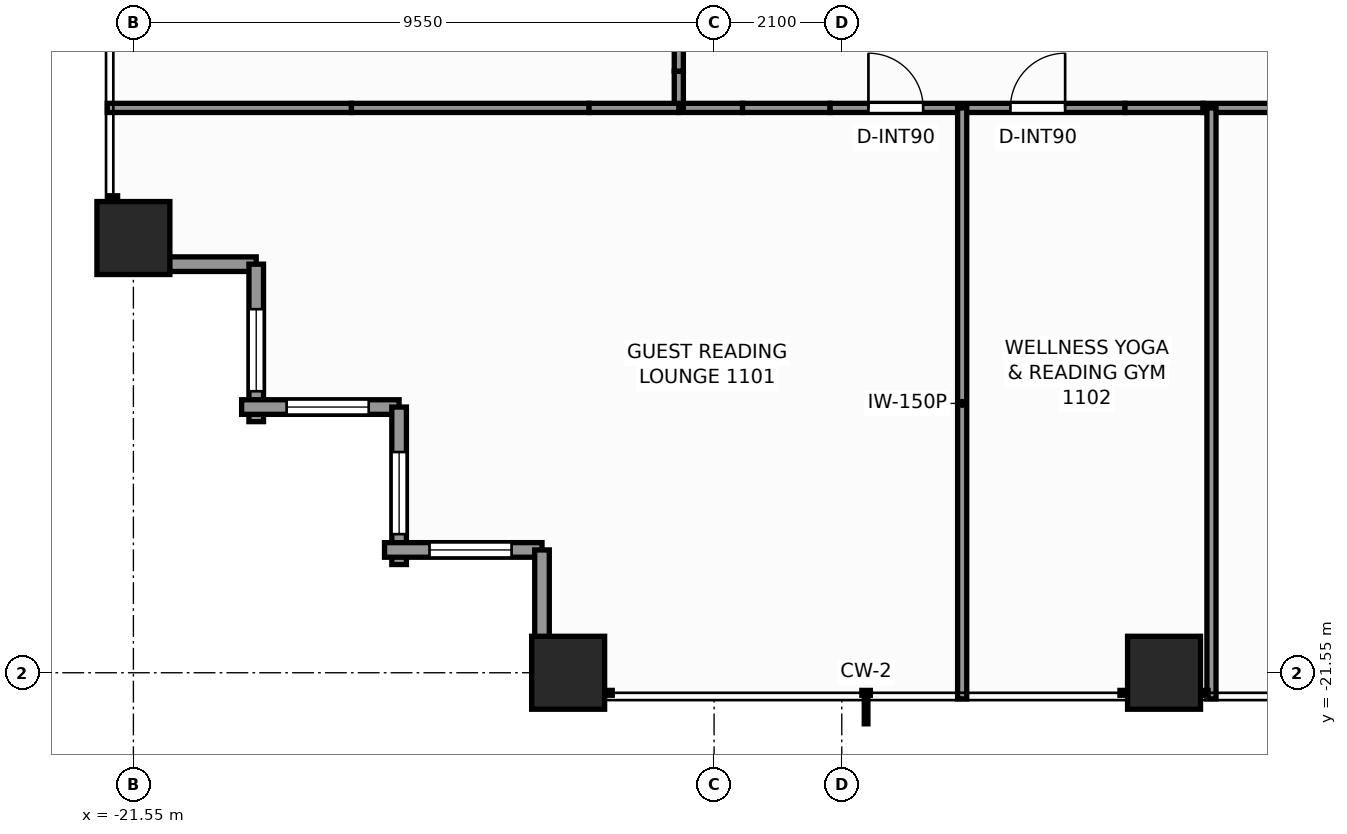
"""IFC4 building model, lengths in metres.
Left out: names, types, materials, properties, quantities, classifications, styles, units other than length and angle.
Written with IfcOpenShell. Run it as: python <this file> out.ifc"""

import sys

from ifc_helpers import new_model, si_unit, direction, frame, frame_2d, origin, origin_2d, place, context, subcontext, project, spatial, rectangle, extrude, element, fill, save


model = new_model("IFC4")
c1 = context("Model", 3, precision=1e-05, world=origin(), true_north=direction((0.0, 1.0)))
c2 = subcontext(c1, "Body", "Model", "MODEL_VIEW")
j1 = project(units=[si_unit("LENGTHUNIT", "METRE"), si_unit("PLANEANGLEUNIT", "RADIAN")], contexts=[c1])
p1 = place(None, origin())
s1 = spatial("IfcSite", under=j1, at=p1, CompositionType="ELEMENT")
p2 = place(p1, origin())
s2 = spatial("IfcBuilding", under=s1, at=p2, CompositionType="ELEMENT")
p3 = place(p2, frame((0.0, 0.0, 40.3)))
s3 = spatial("IfcBuildingStorey", under=s2, at=p3, CompositionType="ELEMENT", Elevation=40.3)
for number, where, z_axis, x_axis in (
    (1, (-14.4, -21.55, 0.0), (0.0, 0.0, 1.0), (1.0, 0.0, 0.0)),
    (2, (-4.6, -21.55, 0.0), (0.0, 0.0, 1.0), (1.0, 0.0, 0.0)),
    (3, (-21.55, -14.4, 0.0), (0.0, 0.0, 1.0), (1.0, 0.0, 0.0)),
):
    element("IfcColumn", number, at=place(p3, frame(where, z_axis=z_axis, x_axis=x_axis)), inside=s3, PredefinedType="COLUMN", context=c2, shape_type="SweptSolid", body=[
        extrude(rectangle(XDim=1.2, YDim=1.2, at=origin_2d()), origin(), (0.0, 0.0, 1.0), 3.3),
    ])
p4 = place(p3, frame((-19.53, -14.83, 0.0), z_axis=(0.0, 0.0, 1.0), x_axis=(-1.0, 0.0, 0.0)))
e4 = element("IfcWall", 4, at=p4, inside=s3, PredefinedType="STANDARD", context=c2, shape_type="SweptSolid", body=[
    extrude(rectangle(XDim=2.59, YDim=0.24, at=frame_2d((1.295, 0.0))), origin(), (0.0, 0.0, 1.0), 1.255),
])
p5 = place(p3, frame((-19.53, -17.42, 0.0), z_axis=(0.0, 0.0, 1.0), x_axis=(0.0, 1.0, 0.0)))
e5 = element("IfcWall", 5, at=p5, inside=s3, PredefinedType="STANDARD", context=c2, shape_type="SweptSolid", body=[
    extrude(rectangle(XDim=2.59, YDim=0.24, at=frame_2d((1.295, 0.0))), origin(), (0.0, 0.0, 1.0), 2.439),
])
p6 = place(p5, frame((0.5, 0.0, 0.65)))
e6 = element("IfcOpeningElement", 6, at=p6, cuts=e5, PredefinedType="OPENING", context=c2, shape_type="SweptSolid", body=[
    extrude(rectangle(XDim=1.35, YDim=1.55, at=frame_2d((0.675, 0.775))), frame((0.0, 0.13, 0.0), z_axis=(0.0, -1.0, 0.0), x_axis=(1.0, 0.0, 0.0)), (0.0, 0.0, 1.0), 0.26),
])
p7 = place(p3, frame((-17.18, -17.18, 0.0), z_axis=(0.0, 0.0, 1.0), x_axis=(-1.0, 0.0, 0.0)))
e7 = element("IfcWall", 7, at=p7, inside=s3, PredefinedType="STANDARD", context=c2, shape_type="SweptSolid", body=[
    extrude(rectangle(XDim=2.59, YDim=0.24, at=frame_2d((1.295, 0.0))), origin(), (0.0, 0.0, 1.0), 2.439),
])
p8 = place(p7, frame((0.5, 0.0, 0.65)))
e8 = element("IfcOpeningElement", 8, at=p8, cuts=e7, PredefinedType="OPENING", context=c2, shape_type="SweptSolid", body=[
    extrude(rectangle(XDim=1.35, YDim=1.55, at=frame_2d((0.675, 0.775))), frame((0.0, 0.13, 0.0), z_axis=(0.0, -1.0, 0.0), x_axis=(1.0, 0.0, 0.0)), (0.0, 0.0, 1.0), 0.26),
])
p9 = place(p3, frame((-17.18, -19.77, 0.0), z_axis=(0.0, 0.0, 1.0), x_axis=(0.0, 1.0, 0.0)))
e9 = element("IfcWall", 9, at=p9, inside=s3, PredefinedType="STANDARD", context=c2, shape_type="SweptSolid", body=[
    extrude(rectangle(XDim=2.59, YDim=0.24, at=frame_2d((1.295, 0.0))), origin(), (0.0, 0.0, 1.0), 2.439),
])
p10 = place(p9, frame((0.5, 0.0, 0.65)))
e10 = element("IfcOpeningElement", 10, at=p10, cuts=e9, PredefinedType="OPENING", context=c2, shape_type="SweptSolid", body=[
    extrude(rectangle(XDim=1.35, YDim=1.55, at=frame_2d((0.675, 0.775))), frame((0.0, 0.13, 0.0), z_axis=(0.0, -1.0, 0.0), x_axis=(1.0, 0.0, 0.0)), (0.0, 0.0, 1.0), 0.26),
])
p11 = place(p3, frame((-14.83, -19.53, 0.0), z_axis=(0.0, 0.0, 1.0), x_axis=(-1.0, 0.0, 0.0)))
e11 = element("IfcWall", 11, at=p11, inside=s3, PredefinedType="STANDARD", context=c2, shape_type="SweptSolid", body=[
    extrude(rectangle(XDim=2.59, YDim=0.24, at=frame_2d((1.295, 0.0))), origin(), (0.0, 0.0, 1.0), 2.439),
])
p12 = place(p11, frame((0.5, 0.0, 0.65)))
e12 = element("IfcOpeningElement", 12, at=p12, cuts=e11, PredefinedType="OPENING", context=c2, shape_type="SweptSolid", body=[
    extrude(rectangle(XDim=1.35, YDim=1.55, at=frame_2d((0.675, 0.775))), frame((0.0, 0.13, 0.0), z_axis=(0.0, -1.0, 0.0), x_axis=(1.0, 0.0, 0.0)), (0.0, 0.0, 1.0), 0.26),
])
p13 = place(p3, frame((-14.83, -22.12, 0.0), z_axis=(0.0, 0.0, 1.0), x_axis=(0.0, 1.0, 0.0)))
e13 = element("IfcWall", 13, at=p13, inside=s3, PredefinedType="STANDARD", context=c2, shape_type="SweptSolid", body=[
    extrude(rectangle(XDim=2.59, YDim=0.24, at=frame_2d((1.295, 0.0))), origin(), (0.0, 0.0, 1.0), 1.255),
])
p14 = place(p3, frame((-12.58, -12.26, 0.0), z_axis=(0.0, 0.0, 1.0), x_axis=(1.0, 0.0, 0.0)))
e14 = element("IfcWall", 14, at=p14, inside=s3, PredefinedType="PARTITIONING", context=c2, shape_type="SweptSolid", body=[
    extrude(rectangle(XDim=1.049, YDim=0.15, at=frame_2d((0.524, 0.0))), origin(), (0.0, 0.0, 1.0), 3.06),
])
p15 = place(p3, frame((-11.531, -12.26, 0.0), z_axis=(0.0, 0.0, 1.0), x_axis=(1.0, 0.0, 0.0)))
e15 = element("IfcWall", 15, at=p15, inside=s3, PredefinedType="PARTITIONING", context=c2, shape_type="SweptSolid", body=[
    extrude(rectangle(XDim=1.439, YDim=0.15, at=frame_2d((0.72, 0.0))), origin(), (0.0, 0.0, 1.0), 1.245),
])
p16 = place(p3, frame((-10.092, -12.26, 0.0), z_axis=(0.0, 0.0, 1.0), x_axis=(1.0, 0.0, 0.0)))
e16 = element("IfcWall", 16, at=p16, inside=s3, PredefinedType="PARTITIONING", context=c2, shape_type="SweptSolid", body=[
    extrude(rectangle(XDim=4.85, YDim=0.15, at=frame_2d((2.425, 0.0))), origin(), (0.0, 0.0, 1.0), 3.06),
])
p17 = place(p16, frame((0.63, 0.0, 0.0)))
e17 = element("IfcOpeningElement", 17, at=p17, cuts=e16, PredefinedType="OPENING", context=c2, shape_type="SweptSolid", body=[
    extrude(rectangle(XDim=0.9, YDim=2.06, at=frame_2d((0.45, 1.03))), frame((0.0, 0.085, 0.0), z_axis=(0.0, -1.0, 0.0), x_axis=(1.0, 0.0, 0.0)), (0.0, 0.0, 1.0), 0.17),
])
p18 = place(p16, frame((2.965, 0.0, 0.0)))
e18 = element("IfcOpeningElement", 18, at=p18, cuts=e16, PredefinedType="OPENING", context=c2, shape_type="SweptSolid", body=[
    extrude(rectangle(XDim=0.9, YDim=2.06, at=frame_2d((0.45, 1.03))), frame((0.0, 0.085, 0.0), z_axis=(0.0, -1.0, 0.0), x_axis=(1.0, 0.0, 0.0)), (0.0, 0.0, 1.0), 0.17),
])
p19 = place(p3, frame((-5.242, -12.26, 0.0), z_axis=(0.0, 0.0, 1.0), x_axis=(1.0, 0.0, 0.0)))
e19 = element("IfcWall", 19, at=p19, inside=s3, PredefinedType="PARTITIONING", context=c2, shape_type="SweptSolid", body=[
    extrude(rectangle(XDim=1.284, YDim=0.15, at=frame_2d((0.642, 0.0))), origin(), (0.0, 0.0, 1.0), 1.245),
])
p20 = place(p3, frame((-3.958, -12.26, 0.0), z_axis=(0.0, 0.0, 1.0), x_axis=(1.0, 0.0, 0.0)))
e20 = element("IfcWall", 20, at=p20, inside=s3, PredefinedType="PARTITIONING", context=c2, shape_type="SweptSolid", body=[
    extrude(rectangle(XDim=7.916, YDim=0.15, at=frame_2d((3.958, 0.0))), origin(), (0.0, 0.0, 1.0), 2.349),
])
p21 = place(p20, frame((1.485, 0.0, 0.0)))
e21 = element("IfcOpeningElement", 21, at=p21, cuts=e20, PredefinedType="OPENING", context=c2, shape_type="SweptSolid", body=[
    extrude(rectangle(XDim=0.9, YDim=2.06, at=frame_2d((0.45, 1.03))), frame((0.0, 0.085, 0.0), z_axis=(0.0, -1.0, 0.0), x_axis=(1.0, 0.0, 0.0)), (0.0, 0.0, 1.0), 0.17),
])
p22 = place(p3, frame((-12.58, -12.26, 0.0), z_axis=(0.0, 0.0, 1.0), x_axis=(0.0, 1.0, 0.0)))
e22 = element("IfcWall", 22, at=p22, inside=s3, PredefinedType="PARTITIONING", context=c2, shape_type="SweptSolid", body=[
    extrude(rectangle(XDim=0.605, YDim=0.15, at=frame_2d((0.303, 0.0))), origin(), (0.0, 0.0, 1.0), 3.06),
])
p23 = place(p3, frame((-12.58, -11.655, 0.0), z_axis=(0.0, 0.0, 1.0), x_axis=(0.0, 1.0, 0.0)))
e23 = element("IfcWall", 23, at=p23, inside=s3, PredefinedType="PARTITIONING", context=c2, shape_type="SweptSolid", body=[
    extrude(rectangle(XDim=1.439, YDim=0.15, at=frame_2d((0.72, 0.0))), origin(), (0.0, 0.0, 1.0), 1.245),
])
p24 = place(p3, frame((-21.98, -12.26, 0.0), z_axis=(0.0, 0.0, 1.0), x_axis=(1.0, 0.0, 0.0)))
e24 = element("IfcWall", 24, at=p24, inside=s3, PredefinedType="PARTITIONING", context=c2, shape_type="SweptSolid", body=[
    extrude(rectangle(XDim=4.017, YDim=0.15, at=frame_2d((2.008, 0.0))), origin(), (0.0, 0.0, 1.0), 2.429),
])
p25 = place(p3, frame((-17.963, -12.26, 0.0), z_axis=(0.0, 0.0, 1.0), x_axis=(1.0, 0.0, 0.0)))
e25 = element("IfcWall", 25, at=p25, inside=s3, PredefinedType="PARTITIONING", context=c2, shape_type="SweptSolid", body=[
    extrude(rectangle(XDim=3.907, YDim=0.15, at=frame_2d((1.954, 0.0))), origin(), (0.0, 0.0, 1.0), 1.245),
])
p26 = place(p3, frame((-14.056, -12.26, 0.0), z_axis=(0.0, 0.0, 1.0), x_axis=(1.0, 0.0, 0.0)))
e26 = element("IfcWall", 26, at=p26, inside=s3, PredefinedType="PARTITIONING", context=c2, shape_type="SweptSolid", body=[
    extrude(rectangle(XDim=1.476, YDim=0.15, at=frame_2d((0.738, 0.0))), origin(), (0.0, 0.0, 1.0), 3.06),
])
for number, where, z_axis, x_axis in (
    (27, (-7.92, -21.98, 0.0), (0.0, 0.0, 1.0), (0.0, 1.0, 0.0)),
    (28, (-3.82, -21.98, 0.0), (0.0, 0.0, 1.0), (0.0, 1.0, 0.0)),
):
    element("IfcWall", number, at=place(p3, frame(where, z_axis=z_axis, x_axis=x_axis)), inside=s3, PredefinedType="PARTITIONING", context=c2, shape_type="SweptSolid", body=[
        extrude(rectangle(XDim=9.72, YDim=0.15, at=frame_2d((4.86, 0.0))), origin(), (0.0, 0.0, 1.0), 2.429),
    ])
p27 = place(p6, origin())
e29 = element("IfcWindow", 29, at=p27, inside=s3, PartitioningType="SINGLE_PANEL", PredefinedType="WINDOW", context=c2, shape_type="SweptSolid", body=[
    extrude(rectangle(XDim=1.35, YDim=1.55, at=frame_2d((0.675, 0.775))), frame((0.0, 0.03, 0.0), z_axis=(0.0, -1.0, 0.0), x_axis=(1.0, 0.0, 0.0)), (0.0, 0.0, 1.0), 0.06),
])
fill(e6, e29)
p28 = place(p8, origin())
e30 = element("IfcWindow", 30, at=p28, inside=s3, PartitioningType="SINGLE_PANEL", PredefinedType="WINDOW", context=c2, shape_type="SweptSolid", body=[
    extrude(rectangle(XDim=1.35, YDim=1.55, at=frame_2d((0.675, 0.775))), frame((0.0, 0.03, 0.0), z_axis=(0.0, -1.0, 0.0), x_axis=(1.0, 0.0, 0.0)), (0.0, 0.0, 1.0), 0.06),
])
fill(e8, e30)
p29 = place(p10, origin())
e31 = element("IfcWindow", 31, at=p29, inside=s3, PartitioningType="SINGLE_PANEL", PredefinedType="WINDOW", context=c2, shape_type="SweptSolid", body=[
    extrude(rectangle(XDim=1.35, YDim=1.55, at=frame_2d((0.675, 0.775))), frame((0.0, 0.03, 0.0), z_axis=(0.0, -1.0, 0.0), x_axis=(1.0, 0.0, 0.0)), (0.0, 0.0, 1.0), 0.06),
])
fill(e10, e31)
p30 = place(p12, origin())
e32 = element("IfcWindow", 32, at=p30, inside=s3, PartitioningType="SINGLE_PANEL", PredefinedType="WINDOW", context=c2, shape_type="SweptSolid", body=[
    extrude(rectangle(XDim=1.35, YDim=1.55, at=frame_2d((0.675, 0.775))), frame((0.0, 0.03, 0.0), z_axis=(0.0, -1.0, 0.0), x_axis=(1.0, 0.0, 0.0)), (0.0, 0.0, 1.0), 0.06),
])
fill(e12, e32)
p31 = place(p17, origin())
e33 = element("IfcDoor", 33, at=p31, inside=s3, OperationType="SINGLE_SWING_LEFT", PredefinedType="DOOR", context=c2, shape_type="SweptSolid", body=[
    extrude(rectangle(XDim=0.9, YDim=2.06, at=frame_2d((0.45, 1.03))), frame((0.0, 0.025, 0.0), z_axis=(0.0, -1.0, 0.0), x_axis=(1.0, 0.0, 0.0)), (0.0, 0.0, 1.0), 0.05),
])
fill(e17, e33)
p32 = place(p18, origin())
e34 = element("IfcDoor", 34, at=p32, inside=s3, OperationType="SINGLE_SWING_RIGHT", PredefinedType="DOOR", context=c2, shape_type="SweptSolid", body=[
    extrude(rectangle(XDim=0.9, YDim=2.06, at=frame_2d((0.45, 1.03))), frame((0.0, 0.025, 0.0), z_axis=(0.0, -1.0, 0.0), x_axis=(1.0, 0.0, 0.0)), (0.0, 0.0, 1.0), 0.05),
])
fill(e18, e34)
save(model, sys.argv[1])
